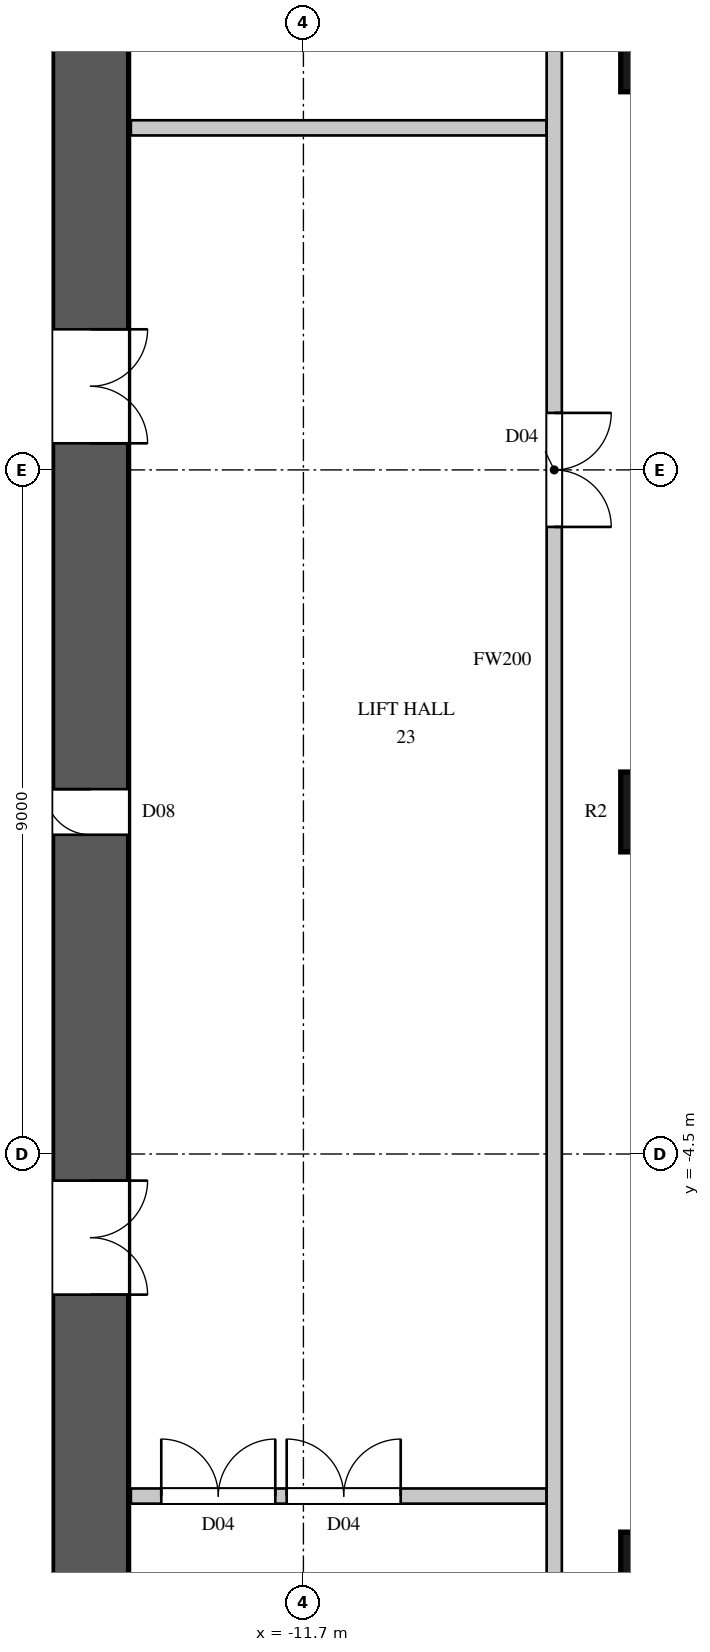
"""IFC4 building model, lengths in metres.
Left out: names, types, materials, properties, quantities, classifications, styles, units other than length and angle.
Written with IfcOpenShell. Run it as: python <this file> out.ifc"""

import sys

from ifc_helpers import new_model, si_unit, direction, frame, frame_2d, origin, origin_2d, place, context, subcontext, project, spatial, rectangle, circle, extrude, element, fill, save


model = new_model("IFC4")
c1 = context("Model", 3, precision=1e-05, world=origin(), true_north=direction((0.0, 1.0)))
c2 = subcontext(c1, "Body", "Model", "MODEL_VIEW")
j1 = project(units=[si_unit("LENGTHUNIT", "METRE"), si_unit("PLANEANGLEUNIT", "RADIAN")], contexts=[c1])
p1 = place(None, origin())
s1 = spatial("IfcSite", under=j1, at=p1, CompositionType="ELEMENT")
p2 = place(p1, origin())
s2 = spatial("IfcBuilding", under=s1, at=p2, CompositionType="ELEMENT")
p3 = place(p2, frame((0.0, 0.0, 113.1)))
s3 = spatial("IfcBuildingStorey", under=s2, at=p3, CompositionType="ELEMENT", Elevation=113.1)
for number, where, z_axis, x_axis in (
    (1, (-7.0, -10.0, 0.0), (0.0, 0.0, 1.0), (1.0, 0.0, 0.0)),
    (2, (-7.0, 0.0, 0.0), (0.0, 0.0, 1.0), (1.0, 0.0, 0.0)),
    (3, (-7.0, 10.0, 0.0), (0.0, 0.0, 1.0), (1.0, 0.0, 0.0)),
):
    element("IfcColumn", number, at=place(p3, frame(where, z_axis=z_axis, x_axis=x_axis)), inside=s3, PredefinedType="COLUMN", context=c2, shape_type="SweptSolid", body=[
        extrude(circle(Radius=0.525, at=origin_2d()), origin(), (0.0, 0.0, 1.0), 3.6),
    ])
p4 = place(p3, frame((-14.5, -14.8, 0.0), z_axis=(0.0, 0.0, 1.0), x_axis=(0.0, 1.0, 0.0)))
e4 = element("IfcWall", 4, at=p4, inside=s3, PredefinedType="SHEAR", context=c2, shape_type="SweptSolid", body=[
    extrude(rectangle(XDim=29.6, YDim=1.0, at=frame_2d((14.8, 0.0))), origin(), (0.0, 0.0, 1.0), 3.6),
])
p5 = place(p4, frame((8.45, 0.0, 0.0)))
e5 = element("IfcOpeningElement", 5, at=p5, cuts=e4, PredefinedType="OPENING", context=c2, shape_type="SweptSolid", body=[
    extrude(rectangle(XDim=1.5, YDim=2.4, at=frame_2d((0.75, 1.2))), frame((0.0, 0.51, 0.0), z_axis=(0.0, -1.0, 0.0), x_axis=(1.0, 0.0, 0.0)), (0.0, 0.0, 1.0), 1.02),
])
p6 = place(p4, frame((19.65, 0.0, 0.0)))
e6 = element("IfcOpeningElement", 6, at=p6, cuts=e4, PredefinedType="OPENING", context=c2, shape_type="SweptSolid", body=[
    extrude(rectangle(XDim=1.5, YDim=2.4, at=frame_2d((0.75, 1.2))), frame((0.0, 0.51, 0.0), z_axis=(0.0, -1.0, 0.0), x_axis=(1.0, 0.0, 0.0)), (0.0, 0.0, 1.0), 1.02),
])
p7 = place(p4, frame((14.5, 0.0, 0.0)))
e7 = element("IfcOpeningElement", 7, at=p7, cuts=e4, PredefinedType="OPENING", context=c2, shape_type="SweptSolid", body=[
    extrude(rectangle(XDim=0.6, YDim=2.0, at=frame_2d((0.3, 1.0))), frame((0.0, 0.51, 0.0), z_axis=(0.0, -1.0, 0.0), x_axis=(1.0, 0.0, 0.0)), (0.0, 0.0, 1.0), 1.02),
])
p8 = place(p3, frame((-13.97, -9.0, 0.0), z_axis=(0.0, 0.0, 1.0), x_axis=(1.0, 0.0, 0.0)))
e8 = element("IfcWall", 8, at=p8, inside=s3, PredefinedType="PARTITIONING", context=c2, shape_type="SweptSolid", body=[
    extrude(rectangle(XDim=5.47, YDim=0.2, at=frame_2d((2.735, 0.0))), origin(), (0.0, 0.0, 1.0), 3.3),
])
p9 = place(p8, frame((0.4, 0.0, 0.0)))
e9 = element("IfcOpeningElement", 9, at=p9, cuts=e8, PredefinedType="OPENING", context=c2, shape_type="SweptSolid", body=[
    extrude(rectangle(XDim=1.5, YDim=2.2, at=frame_2d((0.75, 1.1))), frame((0.0, 0.11, 0.0), z_axis=(0.0, -1.0, 0.0), x_axis=(1.0, 0.0, 0.0)), (0.0, 0.0, 1.0), 0.22),
])
p10 = place(p8, frame((2.05, 0.0, 0.0)))
e10 = element("IfcOpeningElement", 10, at=p10, cuts=e8, PredefinedType="OPENING", context=c2, shape_type="SweptSolid", body=[
    extrude(rectangle(XDim=1.5, YDim=2.2, at=frame_2d((0.75, 1.1))), frame((0.0, 0.11, 0.0), z_axis=(0.0, -1.0, 0.0), x_axis=(1.0, 0.0, 0.0)), (0.0, 0.0, 1.0), 0.22),
])
p11 = place(p3, frame((-13.97, 9.0, 0.0), z_axis=(0.0, 0.0, 1.0), x_axis=(1.0, 0.0, 0.0)))
e11 = element("IfcWall", 11, at=p11, inside=s3, PredefinedType="PARTITIONING", context=c2, shape_type="SweptSolid", body=[
    extrude(rectangle(XDim=5.47, YDim=0.2, at=frame_2d((2.735, 0.0))), origin(), (0.0, 0.0, 1.0), 3.3),
])
p12 = place(p3, frame((-8.4, -11.3, 0.0), z_axis=(0.0, 0.0, 1.0), x_axis=(0.0, 1.0, 0.0)))
e12 = element("IfcWall", 12, at=p12, inside=s3, PredefinedType="PARTITIONING", context=c2, shape_type="SweptSolid", body=[
    extrude(rectangle(XDim=26.6, YDim=0.2, at=frame_2d((13.3, 0.0))), origin(), (0.0, 0.0, 1.0), 3.3),
])
p13 = place(p12, frame((15.05, 0.0, 0.0)))
e13 = element("IfcOpeningElement", 13, at=p13, cuts=e12, PredefinedType="OPENING", context=c2, shape_type="SweptSolid", body=[
    extrude(rectangle(XDim=1.5, YDim=2.2, at=frame_2d((0.75, 1.1))), frame((0.0, 0.11, 0.0), z_axis=(0.0, -1.0, 0.0), x_axis=(1.0, 0.0, 0.0)), (0.0, 0.0, 1.0), 0.22),
])
p14 = place(p12, frame((25.55, 0.0, 0.0)))
e14 = element("IfcOpeningElement", 14, at=p14, cuts=e12, PredefinedType="OPENING", context=c2, shape_type="SweptSolid", body=[
    extrude(rectangle(XDim=0.9, YDim=2.2, at=frame_2d((0.45, 1.1))), frame((0.0, 0.11, 0.0), z_axis=(0.0, -1.0, 0.0), x_axis=(1.0, 0.0, 0.0)), (0.0, 0.0, 1.0), 0.22),
])
p15 = place(p13, origin())
e15 = element("IfcDoor", 15, at=p15, inside=s3, OperationType="DOUBLE_DOOR_SINGLE_SWING", PredefinedType="DOOR", context=c2, shape_type="SweptSolid", body=[
    extrude(rectangle(XDim=1.5, YDim=2.2, at=frame_2d((0.75, 1.1))), frame((0.0, 0.025, 0.0), z_axis=(0.0, -1.0, 0.0), x_axis=(1.0, 0.0, 0.0)), (0.0, 0.0, 1.0), 0.05),
])
fill(e13, e15)
p16 = place(p9, origin())
e16 = element("IfcDoor", 16, at=p16, inside=s3, OperationType="DOUBLE_DOOR_SINGLE_SWING", PredefinedType="DOOR", context=c2, shape_type="SweptSolid", body=[
    extrude(rectangle(XDim=1.5, YDim=2.2, at=frame_2d((0.75, 1.1))), frame((0.0, 0.025, 0.0), z_axis=(0.0, -1.0, 0.0), x_axis=(1.0, 0.0, 0.0)), (0.0, 0.0, 1.0), 0.05),
])
fill(e9, e16)
p17 = place(p10, origin())
e17 = element("IfcDoor", 17, at=p17, inside=s3, OperationType="DOUBLE_DOOR_SINGLE_SWING", PredefinedType="DOOR", context=c2, shape_type="SweptSolid", body=[
    extrude(rectangle(XDim=1.5, YDim=2.2, at=frame_2d((0.75, 1.1))), frame((0.0, 0.025, 0.0), z_axis=(0.0, -1.0, 0.0), x_axis=(1.0, 0.0, 0.0)), (0.0, 0.0, 1.0), 0.05),
])
fill(e10, e17)
p18 = place(p5, origin())
e18 = element("IfcDoor", 18, at=p18, inside=s3, OperationType="DOUBLE_DOOR_SINGLE_SWING", PredefinedType="DOOR", context=c2, shape_type="SweptSolid", body=[
    extrude(rectangle(XDim=1.5, YDim=2.4, at=frame_2d((0.75, 1.2))), frame((0.0, -0.445, 0.0), z_axis=(0.0, -1.0, 0.0), x_axis=(1.0, 0.0, 0.0)), (0.0, 0.0, 1.0), 0.05),
])
fill(e5, e18)
p19 = place(p6, origin())
e19 = element("IfcDoor", 19, at=p19, inside=s3, OperationType="DOUBLE_DOOR_SINGLE_SWING", PredefinedType="DOOR", context=c2, shape_type="SweptSolid", body=[
    extrude(rectangle(XDim=1.5, YDim=2.4, at=frame_2d((0.75, 1.2))), frame((0.0, -0.445, 0.0), z_axis=(0.0, -1.0, 0.0), x_axis=(1.0, 0.0, 0.0)), (0.0, 0.0, 1.0), 0.05),
])
fill(e6, e19)
p20 = place(p7, origin())
e20 = element("IfcDoor", 20, at=p20, inside=s3, OperationType="SINGLE_SWING_RIGHT", PredefinedType="DOOR", context=c2, shape_type="SweptSolid", body=[
    extrude(rectangle(XDim=0.6, YDim=2.0, at=frame_2d((0.3, 1.0))), frame((0.0, 0.495, 0.0), z_axis=(0.0, -1.0, 0.0), x_axis=(1.0, 0.0, 0.0)), (0.0, 0.0, 1.0), 0.05),
])
fill(e7, e20)
save(model, sys.argv[1])
